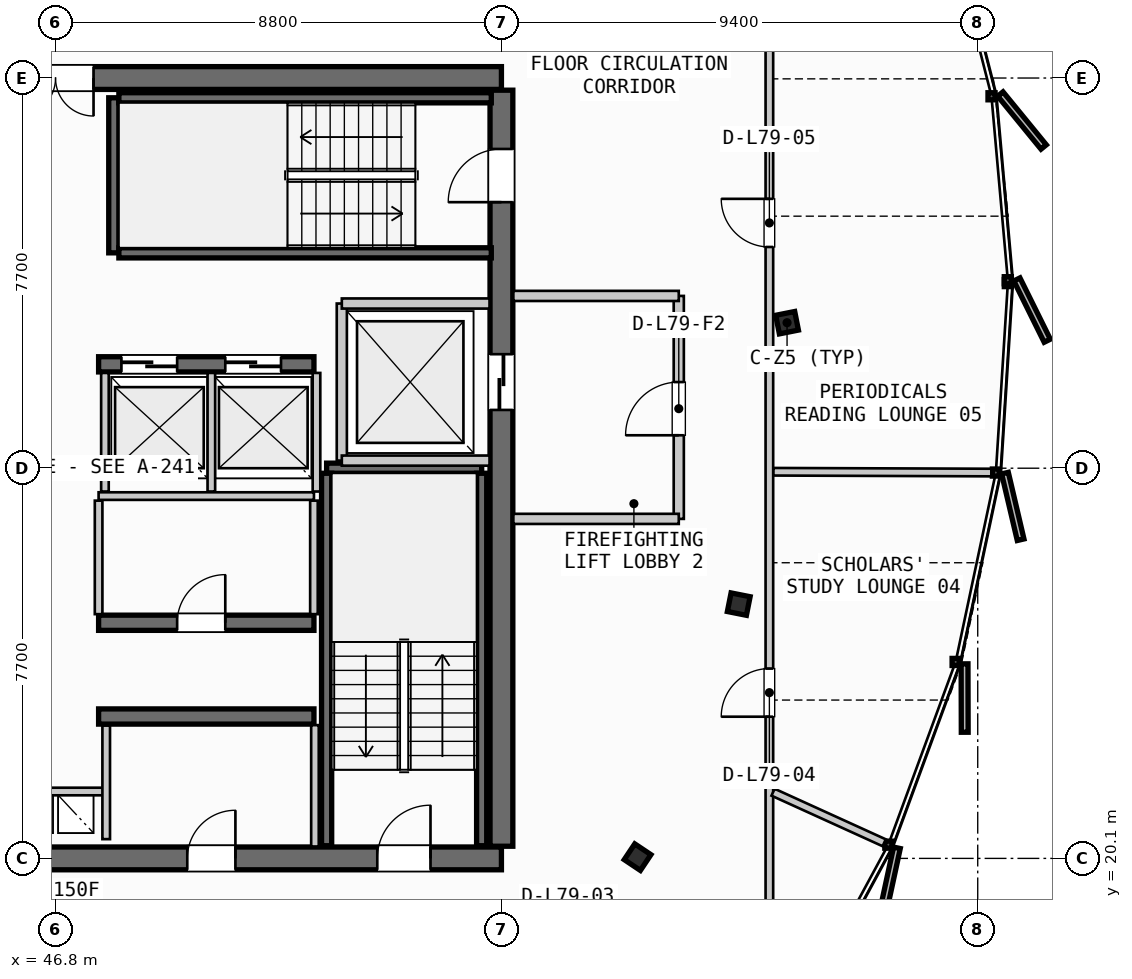
"""IFC4 building model, lengths in metres.
Left out: names, types, materials, properties, quantities, classifications, styles, units other than length and angle.
Written with IfcOpenShell. Run it as: python <this file> out.ifc"""

import sys

from ifc_helpers import new_model, si_unit, direction, frame, frame_2d, origin, origin_2d, place, context, subcontext, project, spatial, rectangle, i_section, extrude, source, transform, mapped, element, fill, save


model = new_model("IFC4")
c1 = context("Model", 3, precision=1e-05, world=origin(), true_north=direction((0.0, 1.0)))
c2 = subcontext(c1, "Body", "Model", "MODEL_VIEW")
j1 = project(units=[si_unit("LENGTHUNIT", "METRE"), si_unit("PLANEANGLEUNIT", "RADIAN")], contexts=[c1])
p1 = place(None, origin())
s1 = spatial("IfcSite", under=j1, at=p1, CompositionType="ELEMENT")
p2 = place(p1, origin())
s2 = spatial("IfcBuilding", under=s1, at=p2, CompositionType="ELEMENT")
p3 = place(p2, frame((0.0, 0.0, 297.4)))
s3 = spatial("IfcBuildingStorey", under=s2, at=p3, CompositionType="ELEMENT", Elevation=297.4)
p4 = place(p3, frame((38.0, 20.1, 0.0), z_axis=(0.0, 0.0, 1.0), x_axis=(1.0, 0.0, 0.0)))
e1 = element("IfcWall", 1, at=p4, inside=s3, PredefinedType="SHEAR", context=c2, shape_type="SweptSolid", body=[
    extrude(rectangle(XDim=17.6, YDim=0.45, at=frame_2d((8.8, 0.0))), origin(), (0.0, 0.0, 1.0), 3.21),
])
p5 = place(p4, frame((1.4, 0.0, 0.0)))
e2 = element("IfcOpeningElement", 2, at=p5, cuts=e1, PredefinedType="OPENING", context=c2, shape_type="SweptSolid", body=[
    extrude(rectangle(XDim=1.05, YDim=2.15, at=frame_2d((0.525, 1.075))), frame((0.0, 0.235, 0.0), z_axis=(0.0, -1.0, 0.0), x_axis=(1.0, 0.0, 0.0)), (0.0, 0.0, 1.0), 0.47),
])
p6 = place(p4, frame((15.15, 0.0, 0.0)))
e3 = element("IfcOpeningElement", 3, at=p6, cuts=e1, PredefinedType="OPENING", context=c2, shape_type="SweptSolid", body=[
    extrude(rectangle(XDim=1.05, YDim=2.15, at=frame_2d((0.525, 1.075))), frame((0.0, 0.235, 0.0), z_axis=(0.0, -1.0, 0.0), x_axis=(1.0, 0.0, 0.0)), (0.0, 0.0, 1.0), 0.47),
])
p7 = place(p4, frame((5.25, 0.0, 0.0)))
e4 = element("IfcOpeningElement", 4, at=p7, cuts=e1, PredefinedType="OPENING", context=c2, shape_type="SweptSolid", body=[
    extrude(rectangle(XDim=0.95, YDim=2.15, at=frame_2d((0.475, 1.075))), frame((0.0, 0.235, 0.0), z_axis=(0.0, -1.0, 0.0), x_axis=(1.0, 0.0, 0.0)), (0.0, 0.0, 1.0), 0.47),
])
p8 = place(p4, frame((11.4, 0.0, 0.0)))
e5 = element("IfcOpeningElement", 5, at=p8, cuts=e1, PredefinedType="OPENING", context=c2, shape_type="SweptSolid", body=[
    extrude(rectangle(XDim=0.95, YDim=2.15, at=frame_2d((0.475, 1.075))), frame((0.0, 0.235, 0.0), z_axis=(0.0, -1.0, 0.0), x_axis=(1.0, 0.0, 0.0)), (0.0, 0.0, 1.0), 0.47),
])
p9 = place(p3, frame((55.6, 35.5, 0.0), z_axis=(0.0, 0.0, 1.0), x_axis=(-1.0, 0.0, 0.0)))
e6 = element("IfcWall", 6, at=p9, inside=s3, PredefinedType="SHEAR", context=c2, shape_type="SweptSolid", body=[
    extrude(rectangle(XDim=17.6, YDim=0.45, at=frame_2d((8.8, 0.0))), origin(), (0.0, 0.0, 1.0), 3.21),
])
p10 = place(p9, frame((8.05, 0.0, 0.0)))
e7 = element("IfcOpeningElement", 7, at=p10, cuts=e6, PredefinedType="OPENING", context=c2, shape_type="SweptSolid", body=[
    extrude(rectangle(XDim=1.5, YDim=2.2, at=frame_2d((0.75, 1.1))), frame((0.0, 0.235, 0.0), z_axis=(0.0, -1.0, 0.0), x_axis=(1.0, 0.0, 0.0)), (0.0, 0.0, 1.0), 0.47),
])
p11 = place(p9, frame((15.85, 0.0, 0.0)))
e8 = element("IfcOpeningElement", 8, at=p11, cuts=e6, PredefinedType="OPENING", context=c2, shape_type="SweptSolid", body=[
    extrude(rectangle(XDim=0.85, YDim=2.15, at=frame_2d((0.425, 1.075))), frame((0.0, 0.235, 0.0), z_axis=(0.0, -1.0, 0.0), x_axis=(1.0, 0.0, 0.0)), (0.0, 0.0, 1.0), 0.47),
])
p12 = place(p9, frame((14.35, 0.0, 0.0)))
e9 = element("IfcOpeningElement", 9, at=p12, cuts=e6, PredefinedType="OPENING", context=c2, shape_type="SweptSolid", body=[
    extrude(rectangle(XDim=0.85, YDim=2.15, at=frame_2d((0.425, 1.075))), frame((0.0, 0.235, 0.0), z_axis=(0.0, -1.0, 0.0), x_axis=(1.0, 0.0, 0.0)), (0.0, 0.0, 1.0), 0.47),
])
p13 = place(p9, frame((12.3, 0.0, 0.0)))
e10 = element("IfcOpeningElement", 10, at=p13, cuts=e6, PredefinedType="OPENING", context=c2, shape_type="SweptSolid", body=[
    extrude(rectangle(XDim=0.95, YDim=2.15, at=frame_2d((0.475, 1.075))), frame((0.0, 0.235, 0.0), z_axis=(0.0, -1.0, 0.0), x_axis=(1.0, 0.0, 0.0)), (0.0, 0.0, 1.0), 0.47),
])
p14 = place(p9, frame((10.2, 0.0, 0.0)))
e11 = element("IfcOpeningElement", 11, at=p14, cuts=e6, PredefinedType="OPENING", context=c2, shape_type="SweptSolid", body=[
    extrude(rectangle(XDim=0.9, YDim=2.15, at=frame_2d((0.45, 1.075))), frame((0.0, 0.235, 0.0), z_axis=(0.0, -1.0, 0.0), x_axis=(1.0, 0.0, 0.0)), (0.0, 0.0, 1.0), 0.47),
])
p15 = place(p3, frame((55.6, 20.34, 0.0), z_axis=(0.0, 0.0, 1.0), x_axis=(0.0, 1.0, 0.0)))
e12 = element("IfcWall", 12, at=p15, inside=s3, PredefinedType="SHEAR", context=c2, shape_type="SweptSolid", body=[
    extrude(rectangle(XDim=14.92, YDim=0.45, at=frame_2d((7.46, 0.0))), origin(), (0.0, 0.0, 1.0), 3.21),
])
p16 = place(p15, frame((12.71, 0.0, 0.0)))
e13 = element("IfcOpeningElement", 13, at=p16, cuts=e12, PredefinedType="OPENING", context=c2, shape_type="SweptSolid", body=[
    extrude(rectangle(XDim=1.05, YDim=2.15, at=frame_2d((0.525, 1.075))), frame((0.0, 0.235, 0.0), z_axis=(0.0, -1.0, 0.0), x_axis=(1.0, 0.0, 0.0)), (0.0, 0.0, 1.0), 0.47),
])
p17 = place(p15, frame((8.61, 0.0, 0.0)))
e14 = element("IfcOpeningElement", 14, at=p17, cuts=e12, PredefinedType="OPENING", context=c2, shape_type="SweptSolid", body=[
    extrude(rectangle(XDim=1.1, YDim=2.2, at=frame_2d((0.55, 1.1))), frame((0.0, 0.235, 0.0), z_axis=(0.0, -1.0, 0.0), x_axis=(1.0, 0.0, 0.0)), (0.0, 0.0, 1.0), 0.47),
])
p18 = place(p3, frame((47.65, 22.9, 0.0), z_axis=(0.0, 0.0, 1.0), x_axis=(1.0, 0.0, 0.0)))
e15 = element("IfcWall", 15, at=p18, inside=s3, PredefinedType="SHEAR", context=c2, shape_type="SweptSolid", body=[
    extrude(rectangle(XDim=4.25, YDim=0.3, at=frame_2d((2.125, 0.0))), origin(), (0.0, 0.0, 1.0), 3.21),
])
p19 = place(p3, frame((47.65, 24.75, 0.0), z_axis=(0.0, 0.0, 1.0), x_axis=(1.0, 0.0, 0.0)))
e16 = element("IfcWall", 16, at=p19, inside=s3, PredefinedType="SHEAR", context=c2, shape_type="SweptSolid", body=[
    extrude(rectangle(XDim=4.25, YDim=0.3, at=frame_2d((2.125, 0.0))), origin(), (0.0, 0.0, 1.0), 3.21),
])
p20 = place(p19, frame((1.55, 0.0, 0.0)))
e17 = element("IfcOpeningElement", 17, at=p20, cuts=e16, PredefinedType="OPENING", context=c2, shape_type="SweptSolid", body=[
    extrude(rectangle(XDim=0.95, YDim=2.15, at=frame_2d((0.475, 1.075))), frame((0.0, 0.16, 0.0), z_axis=(0.0, -1.0, 0.0), x_axis=(1.0, 0.0, 0.0)), (0.0, 0.0, 1.0), 0.32),
])
p21 = place(p3, frame((47.65, 29.85, 0.0), z_axis=(0.0, 0.0, 1.0), x_axis=(1.0, 0.0, 0.0)))
e18 = element("IfcWall", 18, at=p21, inside=s3, PredefinedType="SHEAR", context=c2, shape_type="SweptSolid", body=[
    extrude(rectangle(XDim=4.25, YDim=0.3, at=frame_2d((2.125, 0.0))), origin(), (0.0, 0.0, 1.0), 3.21),
])
p22 = place(p21, frame((0.45, 0.0, 0.0)))
e19 = element("IfcOpeningElement", 19, at=p22, cuts=e18, PredefinedType="OPENING", context=c2, shape_type="SweptSolid", body=[
    extrude(rectangle(XDim=1.1, YDim=2.2, at=frame_2d((0.55, 1.1))), frame((0.0, 0.16, 0.0), z_axis=(0.0, -1.0, 0.0), x_axis=(1.0, 0.0, 0.0)), (0.0, 0.0, 1.0), 0.32),
])
p23 = place(p21, frame((2.5, 0.0, 0.0)))
e20 = element("IfcOpeningElement", 20, at=p23, cuts=e18, PredefinedType="OPENING", context=c2, shape_type="SweptSolid", body=[
    extrude(rectangle(XDim=1.1, YDim=2.2, at=frame_2d((0.55, 1.1))), frame((0.0, 0.16, 0.0), z_axis=(0.0, -1.0, 0.0), x_axis=(1.0, 0.0, 0.0)), (0.0, 0.0, 1.0), 0.32),
])
m1 = source(origin(), c2, "Body", "SweptSolid", [
    extrude(i_section(OverallWidth=0.374, OverallDepth=0.383, WebThickness=0.017, FlangeThickness=0.026, FilletRadius=0.015, at=origin_2d()), origin(), (0.0, 0.0, 1.0), 3.21),
])
for number, where, z_axis, x_axis in (
    (21, (61.237, 30.672, 0.0), (0.0, 0.0, 1.0), (0.981, 0.195, 0.0)),
    (22, (58.287, 20.125, 0.0), (0.0, 0.0, 1.0), (0.831, -0.556, 0.0)),
    (23, (60.284, 25.118, 0.0), (0.0, 0.0, 1.0), (0.981, -0.195, 0.0)),
):
    element("IfcColumn", number, at=place(p3, frame(where, z_axis=z_axis, x_axis=x_axis)), inside=s3, PredefinedType="COLUMN", context=c2, shape_type="MappedRepresentation", body=[
        mapped(m1, transform((0.0, 0.0, 0.0), scale=1.0)),
    ])
p24 = place(p3, frame((52.15, 27.8, 0.0), z_axis=(0.0, 0.0, 1.0), x_axis=(1.0, 0.0, 0.0)))
e24 = element("IfcWall", 24, at=p24, inside=s3, PredefinedType="SHEAR", context=c2, shape_type="SweptSolid", body=[
    extrude(rectangle(XDim=3.06, YDim=0.2, at=frame_2d((1.53, 0.0))), origin(), (0.0, 0.0, 1.0), 3.21),
])
for number, where, z_axis, x_axis in (
    (25, (55.21, 27.7, 0.0), (0.0, 0.0, 1.0), (0.0, -1.0, 0.0)),
    (26, (52.15, 20.35, 0.0), (0.0, 0.0, 1.0), (0.0, 1.0, 0.0)),
):
    element("IfcWall", number, at=place(p3, frame(where, z_axis=z_axis, x_axis=x_axis)), inside=s3, PredefinedType="SHEAR", context=c2, shape_type="SweptSolid", body=[
        extrude(rectangle(XDim=7.35, YDim=0.2, at=frame_2d((3.675, 0.0))), origin(), (0.0, 0.0, 1.0), 3.21),
    ])
p25 = place(p3, frame((47.95, 32.05, 0.0), z_axis=(0.0, 0.0, 1.0), x_axis=(0.0, 1.0, 0.0)))
e27 = element("IfcWall", 27, at=p25, inside=s3, PredefinedType="SHEAR", context=c2, shape_type="SweptSolid", body=[
    extrude(rectangle(XDim=3.06, YDim=0.2, at=frame_2d((1.53, 0.0))), origin(), (0.0, 0.0, 1.0), 3.21),
])
for number, where, z_axis, x_axis in (
    (28, (48.05, 35.11, 0.0), (0.0, 0.0, 1.0), (1.0, 0.0, 0.0)),
    (29, (55.4, 32.05, 0.0), (0.0, 0.0, 1.0), (-1.0, 0.0, 0.0)),
):
    element("IfcWall", number, at=place(p3, frame(where, z_axis=z_axis, x_axis=x_axis)), inside=s3, PredefinedType="SHEAR", context=c2, shape_type="SweptSolid", body=[
        extrude(rectangle(XDim=7.35, YDim=0.2, at=frame_2d((3.675, 0.0))), origin(), (0.0, 0.0, 1.0), 3.21),
    ])
p26 = place(p3, frame((45.8, 21.42, 0.0), z_axis=(0.0, 0.0, 1.0), x_axis=(1.0, 0.0, 0.0)))
e30 = element("IfcWall", 30, at=p26, inside=s3, PredefinedType="PARTITIONING", context=c2, shape_type="SweptSolid", body=[
    extrude(rectangle(XDim=2.0, YDim=0.15, at=frame_2d((1.0, 0.0))), origin(), (0.0, 0.0, 1.0), 2.28),
])
p27 = place(p3, frame((47.8, 20.48, 0.0), z_axis=(0.0, 0.0, 1.0), x_axis=(0.0, 1.0, 0.0)))
e31 = element("IfcWall", 31, at=p27, inside=s3, PredefinedType="PARTITIONING", context=c2, shape_type="SweptSolid", body=[
    extrude(rectangle(XDim=2.24, YDim=0.15, at=frame_2d((1.12, 0.0))), origin(), (0.0, 0.0, 1.0), 2.28),
])
p28 = place(p3, frame((52.45, 27.95, 0.0), z_axis=(0.0, 0.0, 1.0), x_axis=(0.0, 1.0, 0.0)))
e32 = element("IfcWall", 32, at=p28, inside=s3, PredefinedType="PARTITIONING", context=c2, shape_type="SweptSolid", body=[
    extrude(rectangle(XDim=3.1, YDim=0.2, at=frame_2d((1.55, 0.0))), origin(), (0.0, 0.0, 1.0), 2.28),
])
for number, where, z_axis, x_axis in (
    (33, (52.45, 27.95, 0.0), (0.0, 0.0, 1.0), (1.0, 0.0, 0.0)),
    (34, (52.45, 31.05, 0.0), (0.0, 0.0, 1.0), (1.0, 0.0, 0.0)),
):
    element("IfcWall", number, at=place(p3, frame(where, z_axis=z_axis, x_axis=x_axis)), inside=s3, PredefinedType="PARTITIONING", context=c2, shape_type="SweptSolid", body=[
        extrude(rectangle(XDim=2.915, YDim=0.2, at=frame_2d((1.458, 0.0))), origin(), (0.0, 0.0, 1.0), 2.28),
    ])
p29 = place(p3, frame((59.1, 26.8, 0.0), z_axis=(0.0, 0.0, 1.0), x_axis=(0.0, 1.0, 0.0)))
e35 = element("IfcWall", 35, at=p29, inside=s3, PredefinedType="PARTITIONING", context=c2, shape_type="SweptSolid", body=[
    extrude(rectangle(XDim=4.4, YDim=0.2, at=frame_2d((2.2, 0.0))), origin(), (0.0, 0.0, 1.0), 2.28),
])
p30 = place(p29, frame((1.65, 0.0, 0.0)))
e36 = element("IfcOpeningElement", 36, at=p30, cuts=e35, PredefinedType="OPENING", context=c2, shape_type="SweptSolid", body=[
    extrude(rectangle(XDim=1.05, YDim=2.15, at=frame_2d((0.525, 1.075))), frame((0.0, 0.11, 0.0), z_axis=(0.0, -1.0, 0.0), x_axis=(1.0, 0.0, 0.0)), (0.0, 0.0, 1.0), 0.22),
])
for number, where, z_axis, x_axis in (
    (37, (55.835, 26.8, 0.0), (0.0, 0.0, 1.0), (1.0, 0.0, 0.0)),
    (38, (55.835, 31.2, 0.0), (0.0, 0.0, 1.0), (1.0, 0.0, 0.0)),
):
    element("IfcWall", number, at=place(p3, frame(where, z_axis=z_axis, x_axis=x_axis)), inside=s3, PredefinedType="PARTITIONING", context=c2, shape_type="SweptSolid", body=[
        extrude(rectangle(XDim=3.265, YDim=0.2, at=frame_2d((1.633, 0.0))), origin(), (0.0, 0.0, 1.0), 2.28),
    ])
p31 = place(p3, frame((51.92, 20.335, 0.0), z_axis=(0.0, 0.0, 1.0), x_axis=(0.0, 1.0, 0.0)))
e39 = element("IfcWall", 39, at=p31, inside=s3, PredefinedType="PARTITIONING", context=c2, shape_type="SweptSolid", body=[
    extrude(rectangle(XDim=2.395, YDim=0.15, at=frame_2d((1.198, 0.0))), origin(), (0.0, 0.0, 1.0), 2.28),
])
p32 = place(p3, frame((47.65, 27.25, 0.0), z_axis=(0.0, 0.0, 1.0), x_axis=(1.0, 0.0, 0.0)))
e40 = element("IfcWall", 40, at=p32, inside=s3, PredefinedType="PARTITIONING", context=c2, shape_type="SweptSolid", body=[
    extrude(rectangle(XDim=4.25, YDim=0.15, at=frame_2d((2.125, 0.0))), origin(), (0.0, 0.0, 1.0), 2.28),
])
for number, where, z_axis, x_axis in (
    (41, (47.65, 24.92, 0.0), (0.0, 0.0, 1.0), (0.0, 1.0, 0.0)),
    (42, (51.9, 24.92, 0.0), (0.0, 0.0, 1.0), (0.0, 1.0, 0.0)),
):
    element("IfcWall", number, at=place(p3, frame(where, z_axis=z_axis, x_axis=x_axis)), inside=s3, PredefinedType="PARTITIONING", context=c2, shape_type="SweptSolid", body=[
        extrude(rectangle(XDim=2.24, YDim=0.15, at=frame_2d((1.12, 0.0))), origin(), (0.0, 0.0, 1.0), 2.28),
    ])
for number, where, z_axis, x_axis in (
    (43, (47.775, 27.34, 0.0), (0.0, 0.0, 1.0), (0.0, 1.0, 0.0)),
    (44, (49.875, 27.34, 0.0), (0.0, 0.0, 1.0), (0.0, 1.0, 0.0)),
    (45, (51.95, 27.34, 0.0), (0.0, 0.0, 1.0), (0.0, 1.0, 0.0)),
):
    element("IfcWall", number, at=place(p3, frame(where, z_axis=z_axis, x_axis=x_axis)), inside=s3, PredefinedType="PARTITIONING", context=c2, shape_type="SweptSolid", body=[
        extrude(rectangle(XDim=2.34, YDim=0.15, at=frame_2d((1.17, 0.0))), origin(), (0.0, 0.0, 1.0), 2.28),
    ])
p33 = place(p3, frame((60.888, 17.807, 0.0), z_axis=(0.0, 0.0, 1.0), x_axis=(0.0, 1.0, 0.0)))
e46 = element("IfcWall", 46, at=p33, inside=s3, PredefinedType="PARTITIONING", context=c2, shape_type="SweptSolid", body=[
    extrude(rectangle(XDim=19.524, YDim=0.15, at=frame_2d((9.762, 0.0))), origin(), (0.0, 0.0, 1.0), 2.28),
])
p34 = place(p33, frame((5.089, 0.0, 0.0)))
e47 = element("IfcOpeningElement", 47, at=p34, cuts=e46, PredefinedType="OPENING", context=c2, shape_type="SweptSolid", body=[
    extrude(rectangle(XDim=0.95, YDim=2.15, at=frame_2d((0.475, 1.075))), frame((0.0, 0.085, 0.0), z_axis=(0.0, -1.0, 0.0), x_axis=(1.0, 0.0, 0.0)), (0.0, 0.0, 1.0), 0.17),
])
p35 = place(p33, frame((14.359, 0.0, 0.0)))
e48 = element("IfcOpeningElement", 48, at=p35, cuts=e46, PredefinedType="OPENING", context=c2, shape_type="SweptSolid", body=[
    extrude(rectangle(XDim=0.95, YDim=2.15, at=frame_2d((0.475, 1.075))), frame((0.0, 0.085, 0.0), z_axis=(0.0, -1.0, 0.0), x_axis=(1.0, 0.0, 0.0)), (0.0, 0.0, 1.0), 0.17),
])
p36 = place(p3, frame((60.961, 21.406, 0.0), z_axis=(0.0, 0.0, 1.0), x_axis=(0.910238051655, -0.414085364772, 0.0)))
e49 = element("IfcWall", 49, at=p36, inside=s3, PredefinedType="PARTITIONING", context=c2, shape_type="SweptSolid", body=[
    extrude(rectangle(XDim=2.41, YDim=0.15, at=frame_2d((1.205, 0.0))), origin(), (0.0, 0.0, 1.0), 2.28),
])
p37 = place(p3, frame((60.968, 27.73, 0.0), z_axis=(0.0, 0.0, 1.0), x_axis=(0.999993399001, -0.003633449389, 0.0)))
e50 = element("IfcWall", 50, at=p37, inside=s3, PredefinedType="PARTITIONING", context=c2, shape_type="SweptSolid", body=[
    extrude(rectangle(XDim=4.3, YDim=0.15, at=frame_2d((2.15, 0.0))), origin(), (0.0, 0.0, 1.0), 2.28),
])
m2 = source(origin(), c2, "Body", "SweptSolid", [
    extrude(rectangle(XDim=1.05, YDim=2.15, at=frame_2d((0.525, 1.075))), frame((0.0, 0.025, 0.0), z_axis=(0.0, -1.0, 0.0), x_axis=(1.0, 0.0, 0.0)), (0.0, 0.0, 1.0), 0.05),
])
p38 = place(p6, origin())
e51 = element("IfcDoor", 51, at=p38, inside=s3, OperationType="SINGLE_SWING_RIGHT", PredefinedType="DOOR", context=c2, shape_type="MappedRepresentation", body=[
    mapped(m2, transform((0.0, 0.0, 0.0), scale=1.0)),
])
fill(e3, e51)
p39 = place(p16, origin())
e52 = element("IfcDoor", 52, at=p39, inside=s3, OperationType="SINGLE_SWING_LEFT", PredefinedType="DOOR", context=c2, shape_type="MappedRepresentation", body=[
    mapped(m2, transform((0.0, 0.0, 0.0), scale=1.0)),
])
fill(e13, e52)
m3 = source(origin(), c2, "Body", "SweptSolid", [
    extrude(rectangle(XDim=1.5, YDim=2.2, at=frame_2d((0.75, 1.1))), frame((0.0, 0.025, 0.0), z_axis=(0.0, -1.0, 0.0), x_axis=(1.0, 0.0, 0.0)), (0.0, 0.0, 1.0), 0.05),
])
p40 = place(p10, origin())
e53 = element("IfcDoor", 53, at=p40, inside=s3, OperationType="DOUBLE_DOOR_SINGLE_SWING", PredefinedType="DOOR", context=c2, shape_type="MappedRepresentation", body=[
    mapped(m3, transform((0.0, 0.0, 0.0), scale=1.0)),
])
fill(e7, e53)
m4 = source(origin(), c2, "Body", "SweptSolid", [
    extrude(rectangle(XDim=1.1, YDim=2.2, at=frame_2d((0.55, 1.1))), frame((0.0, 0.025, 0.0), z_axis=(0.0, -1.0, 0.0), x_axis=(1.0, 0.0, 0.0)), (0.0, 0.0, 1.0), 0.05),
])
p41 = place(p17, origin())
e54 = element("IfcDoor", 54, at=p41, inside=s3, OperationType="SLIDING_TO_RIGHT", PredefinedType="DOOR", context=c2, shape_type="MappedRepresentation", body=[
    mapped(m4, transform((0.0, 0.0, 0.0), scale=1.0)),
])
fill(e14, e54)
m5 = source(origin(), c2, "Body", "SweptSolid", [
    extrude(rectangle(XDim=0.95, YDim=2.15, at=frame_2d((0.475, 1.075))), frame((0.0, 0.025, 0.0), z_axis=(0.0, -1.0, 0.0), x_axis=(1.0, 0.0, 0.0)), (0.0, 0.0, 1.0), 0.05),
])
p42 = place(p8, origin())
e55 = element("IfcDoor", 55, at=p42, inside=s3, OperationType="SINGLE_SWING_RIGHT", PredefinedType="DOOR", context=c2, shape_type="MappedRepresentation", body=[
    mapped(m5, transform((0.0, 0.0, 0.0), scale=1.0)),
])
fill(e5, e55)
p43 = place(p20, origin())
e56 = element("IfcDoor", 56, at=p43, inside=s3, OperationType="SINGLE_SWING_RIGHT", PredefinedType="DOOR", context=c2, shape_type="MappedRepresentation", body=[
    mapped(m5, transform((0.0, 0.0, 0.0), scale=1.0)),
])
fill(e17, e56)
p44 = place(p22, origin())
e57 = element("IfcDoor", 57, at=p44, inside=s3, OperationType="SLIDING_TO_LEFT", PredefinedType="DOOR", context=c2, shape_type="MappedRepresentation", body=[
    mapped(m4, transform((0.0, 0.0, 0.0), scale=1.0)),
])
fill(e19, e57)
p45 = place(p23, origin())
e58 = element("IfcDoor", 58, at=p45, inside=s3, OperationType="SLIDING_TO_LEFT", PredefinedType="DOOR", context=c2, shape_type="MappedRepresentation", body=[
    mapped(m4, transform((0.0, 0.0, 0.0), scale=1.0)),
])
fill(e20, e58)
p46 = place(p30, origin())
e59 = element("IfcDoor", 59, at=p46, inside=s3, OperationType="SINGLE_SWING_LEFT", PredefinedType="DOOR", context=c2, shape_type="MappedRepresentation", body=[
    mapped(m2, transform((0.0, 0.0, 0.0), scale=1.0)),
])
fill(e36, e59)
p47 = place(p34, origin())
e60 = element("IfcDoor", 60, at=p47, inside=s3, OperationType="SINGLE_SWING_LEFT", PredefinedType="DOOR", context=c2, shape_type="MappedRepresentation", body=[
    mapped(m5, transform((0.0, 0.0, 0.0), scale=1.0)),
])
fill(e47, e60)
p48 = place(p35, origin())
e61 = element("IfcDoor", 61, at=p48, inside=s3, OperationType="SINGLE_SWING_RIGHT", PredefinedType="DOOR", context=c2, shape_type="MappedRepresentation", body=[
    mapped(m5, transform((0.0, 0.0, 0.0), scale=1.0)),
])
fill(e48, e61)
save(model, sys.argv[1])
